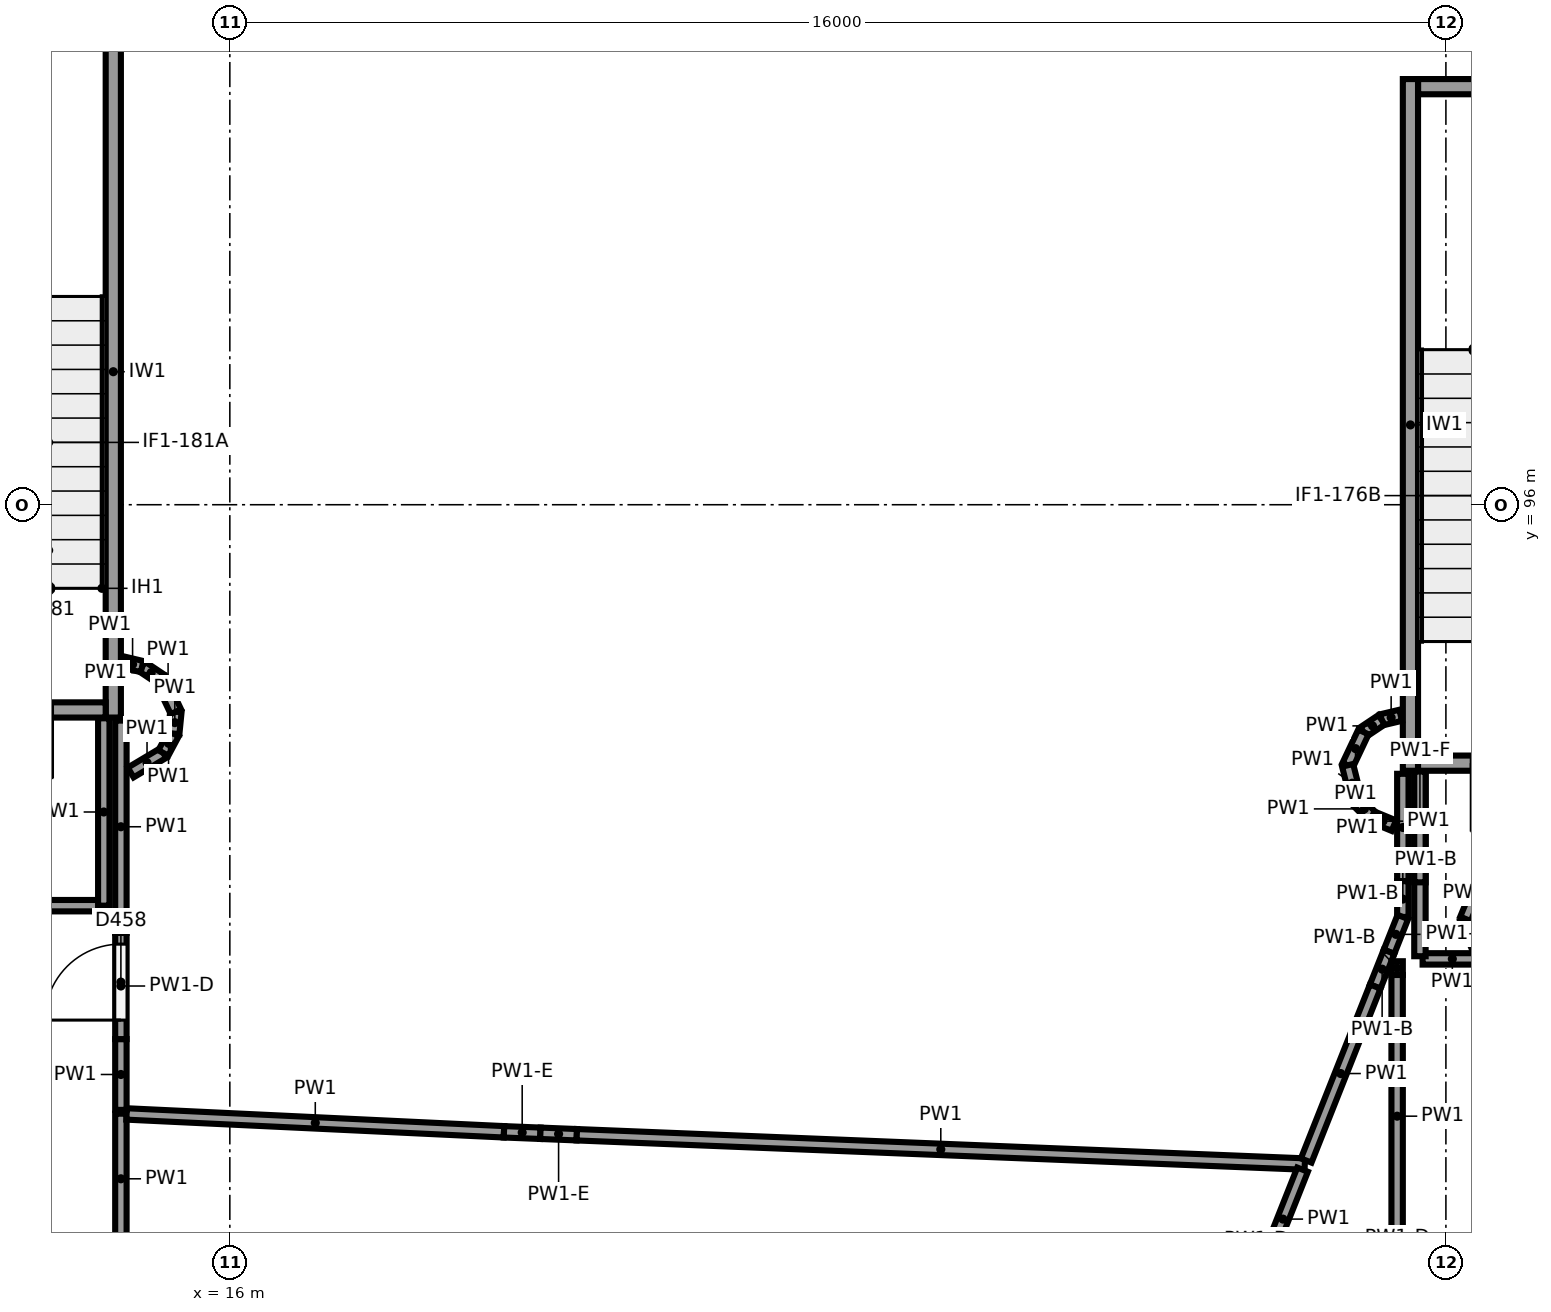
"""IFC4 building model, lengths in metres.
Left out: names, types, materials, properties, quantities, classifications, styles, units other than length and angle.
Written with IfcOpenShell. Run it as: python <this file> out.ifc"""

import sys

from ifc_helpers import new_model, si_unit, direction, frame, frame_2d, origin, origin_2d, place, context, subcontext, project, spatial, rectangle, circle, extrude, element, fill, save


model = new_model("IFC4")
c1 = context("Model", 3, precision=1e-05, world=origin(), true_north=direction((0.0, 1.0)))
c2 = subcontext(c1, "Body", "Model", "MODEL_VIEW")
j1 = project(units=[si_unit("LENGTHUNIT", "METRE"), si_unit("PLANEANGLEUNIT", "RADIAN")], contexts=[c1])
p1 = place(None, origin())
s1 = spatial("IfcSite", under=j1, at=p1, CompositionType="ELEMENT")
p2 = place(p1, origin())
s2 = spatial("IfcBuilding", under=s1, at=p2, CompositionType="ELEMENT")
p3 = place(p2, frame((0.0, 0.0, -4.0)))
s3 = spatial("IfcBuildingStorey", under=s2, at=p3, CompositionType="ELEMENT", Elevation=-4.0)
for number, where, z_axis, x_axis in (
    (1, (20.65, 89.656, -0.4), (0.0, 0.0, 1.0), (1.0, 0.0, 0.0)),
    (2, (23.0, 98.6, -0.4), (0.0, 0.0, 1.0), (1.0, 0.0, 0.0)),
):
    element("IfcColumn", number, at=place(p3, frame(where, z_axis=z_axis, x_axis=x_axis)), inside=s3, PredefinedType="COLUMN", context=c2, shape_type="SweptSolid", body=[
        extrude(circle(Radius=0.45, at=origin_2d()), origin(), (0.0, 0.0, 1.0), 4.4),
    ])
p4 = place(p3, frame((31.533, 101.6, -1.2), z_axis=(0.0, 0.0, 1.0), x_axis=(0.0, -1.0, 0.0)))
e3 = element("IfcWall", 3, at=p4, inside=s3, PredefinedType="SHEAR", context=c2, shape_type="SweptSolid", body=[
    extrude(rectangle(XDim=9.1, YDim=0.2, at=frame_2d((4.55, 0.0))), origin(), (0.0, 0.0, 1.0), 4.8),
])
p5 = place(p3, frame((38.233, 101.5, -1.2), z_axis=(0.0, 0.0, 1.0), x_axis=(-1.0, 0.0, 0.0)))
e4 = element("IfcWall", 4, at=p5, inside=s3, PredefinedType="SHEAR", context=c2, shape_type="SweptSolid", body=[
    extrude(rectangle(XDim=6.6, YDim=0.2, at=frame_2d((3.3, 0.0))), origin(), (0.0, 0.0, 1.0), 4.8),
])
p6 = place(p3, frame((34.833, 92.6, -1.2), z_axis=(0.0, 0.0, 1.0), x_axis=(-1.0, 0.0, 0.0)))
e5 = element("IfcWall", 5, at=p6, inside=s3, PredefinedType="SHEAR", context=c2, shape_type="SweptSolid", body=[
    extrude(rectangle(XDim=3.2, YDim=0.2, at=frame_2d((1.6, 0.0))), origin(), (0.0, 0.0, 1.0), 4.8),
])
p7 = place(p6, frame((0.7, 0.0, 1.2)))
e6 = element("IfcOpeningElement", 6, at=p7, cuts=e5, PredefinedType="OPENING", context=c2, shape_type="SweptSolid", body=[
    extrude(rectangle(XDim=1.8, YDim=2.1, at=frame_2d((0.9, 1.05))), frame((0.0, 0.11, 0.0), z_axis=(0.0, -1.0, 0.0), x_axis=(1.0, 0.0, 0.0)), (0.0, 0.0, 1.0), 0.22),
])
p8 = place(p3, frame((14.467, 102.3, -1.2), z_axis=(0.0, 0.0, 1.0), x_axis=(0.0, -1.0, 0.0)))
e7 = element("IfcWall", 7, at=p8, inside=s3, PredefinedType="SHEAR", context=c2, shape_type="SweptSolid", body=[
    extrude(rectangle(XDim=9.1, YDim=0.2, at=frame_2d((4.55, 0.0))), origin(), (0.0, 0.0, 1.0), 4.8),
])
p9 = place(p3, frame((14.367, 93.3, -1.2), z_axis=(0.0, 0.0, 1.0), x_axis=(-1.0, 0.0, 0.0)))
e8 = element("IfcWall", 8, at=p9, inside=s3, PredefinedType="SHEAR", context=c2, shape_type="SweptSolid", body=[
    extrude(rectangle(XDim=3.2, YDim=0.2, at=frame_2d((1.6, 0.0))), origin(), (0.0, 0.0, 1.0), 4.8),
])
p10 = place(p9, frame((0.7, 0.0, 1.2)))
e9 = element("IfcOpeningElement", 9, at=p10, cuts=e8, PredefinedType="OPENING", context=c2, shape_type="SweptSolid", body=[
    extrude(rectangle(XDim=1.8, YDim=2.1, at=frame_2d((0.9, 1.05))), frame((0.0, 0.11, 0.0), z_axis=(0.0, -1.0, 0.0), x_axis=(1.0, 0.0, 0.0)), (0.0, 0.0, 1.0), 0.22),
])
p11 = place(p3, frame((14.567, 86.275, 0.0), z_axis=(0.0, 0.0, 1.0), x_axis=(0.0, 1.0, 0.0)))
e10 = element("IfcWall", 10, at=p11, inside=s3, PredefinedType="PARTITIONING", context=c2, shape_type="SweptSolid", body=[
    extrude(rectangle(XDim=1.714, YDim=0.15, at=frame_2d((0.857, 0.0))), origin(), (0.0, 0.0, 1.0), 3.6),
])
p12 = place(p3, frame((14.642, 87.985, 0.0), z_axis=(0.0, 0.0, 1.0), x_axis=(0.998880990071, -0.047294478265, 0.0)))
e11 = element("IfcWall", 11, at=p12, inside=s3, PredefinedType="PARTITIONING", context=c2, shape_type="SweptSolid", body=[
    extrude(rectangle(XDim=4.971, YDim=0.15, at=frame_2d((2.486, 0.0))), origin(), (0.0, 0.0, 1.0), 3.6),
])
p13 = place(p3, frame((19.607, 87.75, 0.0), z_axis=(0.0, 0.0, 1.0), x_axis=(0.999190347819, -0.040232435004, 0.0)))
e12 = element("IfcWall", 12, at=p13, inside=s3, PredefinedType="PARTITIONING", context=c2, shape_type="SweptSolid", body=[
    extrude(rectangle(XDim=0.479, YDim=0.15, at=frame_2d((0.24, 0.0))), origin(), (0.0, 0.0, 1.0), 2.85),
])
p14 = place(p3, frame((20.086, 87.731, 0.0), z_axis=(0.0, 0.0, 1.0), x_axis=(0.999189522857, -0.040252918055, 0.0)))
e13 = element("IfcWall", 13, at=p14, inside=s3, PredefinedType="PARTITIONING", context=c2, shape_type="SweptSolid", body=[
    extrude(rectangle(XDim=0.479, YDim=0.15, at=frame_2d((0.24, 0.0))), origin(), (0.0, 0.0, 1.0), 2.85),
])
p15 = place(p3, frame((20.565, 87.711, 0.0), z_axis=(0.0, 0.0, 1.0), x_axis=(0.999191082899, -0.040214174799, 0.0)))
e14 = element("IfcWall", 14, at=p15, inside=s3, PredefinedType="PARTITIONING", context=c2, shape_type="SweptSolid", body=[
    extrude(rectangle(XDim=9.586, YDim=0.15, at=frame_2d((4.793, 0.0))), origin(), (0.0, 0.0, 1.0), 3.6),
])
p16 = place(p3, frame((30.114, 87.252, 0.0), z_axis=(0.0, 0.0, 1.0), x_axis=(-0.368802456255, -0.929507798924, 0.0)))
e15 = element("IfcWall", 15, at=p16, inside=s3, PredefinedType="PARTITIONING", context=c2, shape_type="SweptSolid", body=[
    extrude(rectangle(XDim=1.399, YDim=0.15, at=frame_2d((0.7, 0.0))), origin(), (0.0, 0.0, 1.0), 3.6),
])
p17 = place(p3, frame((14.567, 88.039, 0.0), z_axis=(0.0, 0.0, 1.0), x_axis=(0.0, 1.0, 0.0)))
e16 = element("IfcWall", 16, at=p17, inside=s3, PredefinedType="PARTITIONING", context=c2, shape_type="SweptSolid", body=[
    extrude(rectangle(XDim=0.931, YDim=0.15, at=frame_2d((0.466, 0.0))), origin(), (0.0, 0.0, 1.0), 3.6),
])
p18 = place(p3, frame((14.567, 88.97, 0.0), z_axis=(0.0, 0.0, 1.0), x_axis=(0.0, 1.0, 0.0)))
e17 = element("IfcWall", 17, at=p18, inside=s3, PredefinedType="PARTITIONING", context=c2, shape_type="SweptSolid", body=[
    extrude(rectangle(XDim=1.397, YDim=0.15, at=frame_2d((0.698, 0.0))), origin(), (0.0, 0.0, 1.0), 2.3),
])
p19 = place(p18, frame((0.25, 0.0, 0.0)))
e18 = element("IfcOpeningElement", 18, at=p19, cuts=e17, PredefinedType="OPENING", context=c2, shape_type="SweptSolid", body=[
    extrude(rectangle(XDim=1.0, YDim=2.1, at=frame_2d((0.5, 1.05))), frame((0.0, 0.085, 0.0), z_axis=(0.0, -1.0, 0.0), x_axis=(1.0, 0.0, 0.0)), (0.0, 0.0, 1.0), 0.17),
])
p20 = place(p3, frame((14.567, 90.366, 0.0), z_axis=(0.0, 0.0, 1.0), x_axis=(0.0, 1.0, 0.0)))
e19 = element("IfcWall", 19, at=p20, inside=s3, PredefinedType="PARTITIONING", context=c2, shape_type="SweptSolid", body=[
    extrude(rectangle(XDim=2.793, YDim=0.15, at=frame_2d((1.397, 0.0))), origin(), (0.0, 0.0, 1.0), 3.6),
])
p21 = place(p3, frame((31.433, 92.46, 0.0), z_axis=(0.0, 0.0, 1.0), x_axis=(0.0, -1.0, 0.0)))
e20 = element("IfcWall", 20, at=p21, inside=s3, PredefinedType="PARTITIONING", context=c2, shape_type="SweptSolid", body=[
    extrude(rectangle(XDim=1.413, YDim=0.15, at=frame_2d((0.706, 0.0))), origin(), (0.0, 0.0, 1.0), 3.6),
])
p22 = place(p3, frame((31.433, 91.047, 0.0), z_axis=(0.0, 0.0, 1.0), x_axis=(0.0, -1.0, 0.0)))
e21 = element("IfcWall", 21, at=p22, inside=s3, PredefinedType="PARTITIONING", context=c2, shape_type="SweptSolid", body=[
    extrude(rectangle(XDim=0.471, YDim=0.15, at=frame_2d((0.235, 0.0))), origin(), (0.0, 0.0, 1.0), 2.5),
])
for number, where, z_axis, x_axis in (
    (22, (31.433, 90.577, 0.0), (0.0, 0.0, 1.0), (-0.369, -0.929, 0.0)),
    (23, (31.252, 90.119, 0.0), (0.0, 0.0, 1.0), (-0.369, -0.929, 0.0)),
):
    element("IfcWall", number, at=place(p3, frame(where, z_axis=z_axis, x_axis=x_axis)), inside=s3, PredefinedType="PARTITIONING", context=c2, shape_type="SweptSolid", body=[
        extrude(rectangle(XDim=0.492, YDim=0.15, at=frame_2d((0.246, 0.0))), origin(), (0.0, 0.0, 1.0), 2.5),
    ])
p23 = place(p3, frame((31.07, 89.661, 0.0), z_axis=(0.0, 0.0, 1.0), x_axis=(-0.368825125467, -0.9294988041, 0.0)))
e24 = element("IfcWall", 24, at=p23, inside=s3, PredefinedType="PARTITIONING", context=c2, shape_type="SweptSolid", body=[
    extrude(rectangle(XDim=2.462, YDim=0.15, at=frame_2d((1.231, 0.0))), origin(), (0.0, 0.0, 1.0), 3.6),
])
p24 = place(p3, frame((31.693, 90.025, 0.0), z_axis=(0.0, 0.0, 1.0), x_axis=(1.0, 0.0, 0.0)))
e25 = element("IfcWall", 25, at=p24, inside=s3, PredefinedType="PARTITIONING", context=c2, shape_type="SweptSolid", body=[
    extrude(rectangle(XDim=0.782, YDim=0.15, at=frame_2d((0.391, 0.0))), origin(), (0.0, 0.0, 1.0), 3.6),
])
p25 = place(p3, frame((32.475, 90.025, 0.0), z_axis=(0.0, 0.0, 1.0), x_axis=(-0.382452777268, 0.923975039252, 0.0)))
e26 = element("IfcWall", 26, at=p25, inside=s3, PredefinedType="PARTITIONING", context=c2, shape_type="SweptSolid", body=[
    extrude(rectangle(XDim=0.569, YDim=0.15, at=frame_2d((0.285, 0.0))), origin(), (0.0, 0.0, 1.0), 2.5),
])
p26 = place(p3, frame((32.258, 90.551, 0.0), z_axis=(0.0, 0.0, 1.0), x_axis=(0.382666625355, 0.923886494024, 0.0)))
e27 = element("IfcWall", 27, at=p26, inside=s3, PredefinedType="PARTITIONING", context=c2, shape_type="SweptSolid", body=[
    extrude(rectangle(XDim=0.525, YDim=0.15, at=frame_2d((0.263, 0.0))), origin(), (0.0, 0.0, 1.0), 2.5),
])
p27 = place(p3, frame((31.658, 92.49, 0.0), z_axis=(0.0, 0.0, 1.0), x_axis=(0.0, -1.0, 0.0)))
e28 = element("IfcWall", 28, at=p27, inside=s3, PredefinedType="PARTITIONING", context=c2, shape_type="SweptSolid", body=[
    extrude(rectangle(XDim=2.43, YDim=0.15, at=frame_2d((1.215, 0.0))), origin(), (0.0, 0.0, 1.0), 2.5),
])
p28 = place(p3, frame((31.658, 92.49, 2.5), z_axis=(0.0, 0.0, 1.0), x_axis=(0.0, -1.0, 0.0)))
e29 = element("IfcWall", 29, at=p28, inside=s3, PredefinedType="PARTITIONING", context=c2, shape_type="SweptSolid", body=[
    extrude(rectangle(XDim=1.458, YDim=0.15, at=frame_2d((0.729, 0.0))), origin(), (0.0, 0.0, 1.0), 1.1),
])
p29 = place(p3, frame((31.358, 89.994, 0.0), z_axis=(0.0, 0.0, 1.0), x_axis=(0.0, -1.0, 0.0)))
e30 = element("IfcWall", 30, at=p29, inside=s3, PredefinedType="PARTITIONING", context=c2, shape_type="SweptSolid", body=[
    extrude(rectangle(XDim=0.181, YDim=0.15, at=frame_2d((0.09, 0.0))), origin(), (0.0, 0.0, 1.0), 2.5),
])
p30 = place(p3, frame((31.358, 89.813, 0.0), z_axis=(0.0, 0.0, 1.0), x_axis=(0.0, -1.0, 0.0)))
e31 = element("IfcWall", 31, at=p30, inside=s3, PredefinedType="PARTITIONING", context=c2, shape_type="SweptSolid", body=[
    extrude(rectangle(XDim=3.715, YDim=0.15, at=frame_2d((1.857, 0.0))), origin(), (0.0, 0.0, 1.0), 3.6),
])
p31 = place(p3, frame((31.405, 93.23, 0.0), z_axis=(0.0, 0.0, 1.0), x_axis=(-0.973130593004, -0.230253879357, 0.0)))
e32 = element("IfcWall", 32, at=p31, inside=s3, PredefinedType="PARTITIONING", context=c2, shape_type="SweptSolid", body=[
    extrude(rectangle(XDim=0.258, YDim=0.15, at=frame_2d((0.129, 0.0))), origin(), (0.0, 0.0, 1.0), 3.6),
])
p32 = place(p3, frame((31.154, 93.17, 0.0), z_axis=(0.0, 0.0, 1.0), x_axis=(-0.831397130511, -0.555678694372, 0.0)))
e33 = element("IfcWall", 33, at=p32, inside=s3, PredefinedType="PARTITIONING", context=c2, shape_type="SweptSolid", body=[
    extrude(rectangle(XDim=0.288, YDim=0.15, at=frame_2d((0.144, 0.0))), origin(), (0.0, 0.0, 1.0), 3.6),
])
for number, where, z_axis, x_axis in (
    (34, (30.915, 93.01, 0.0), (0.0, 0.0, 1.0), (-0.428, -0.904, 0.0)),
    (35, (30.707, 92.572, 0.0), (0.0, 0.0, 1.0), (0.243, -0.97, 0.0)),
):
    element("IfcWall", number, at=place(p3, frame(where, z_axis=z_axis, x_axis=x_axis)), inside=s3, PredefinedType="PARTITIONING", context=c2, shape_type="SweptSolid", body=[
        extrude(rectangle(XDim=0.486, YDim=0.15, at=frame_2d((0.243, 0.0))), origin(), (0.0, 0.0, 1.0), 3.6),
    ])
p33 = place(p3, frame((30.825, 92.101, 0.0), z_axis=(0.0, 0.0, 1.0), x_axis=(0.707106781187, -0.707106781187, 0.0)))
e36 = element("IfcWall", 36, at=p33, inside=s3, PredefinedType="PARTITIONING", context=c2, shape_type="SweptSolid", body=[
    extrude(rectangle(XDim=0.289, YDim=0.15, at=frame_2d((0.145, 0.0))), origin(), (0.0, 0.0, 1.0), 3.6),
])
p34 = place(p3, frame((31.03, 91.896, 0.0), z_axis=(0.0, 0.0, 1.0), x_axis=(0.923707957869, -0.383097387839, 0.0)))
e37 = element("IfcWall", 37, at=p34, inside=s3, PredefinedType="PARTITIONING", context=c2, shape_type="SweptSolid", body=[
    extrude(rectangle(XDim=0.308, YDim=0.15, at=frame_2d((0.154, 0.0))), origin(), (0.0, 0.0, 1.0), 3.6),
])
p35 = place(p3, frame((10.327, 90.725, 0.0), z_axis=(0.0, 0.0, 1.0), x_axis=(1.0, 0.0, 0.0)))
e38 = element("IfcWall", 38, at=p35, inside=s3, PredefinedType="PARTITIONING", context=c2, shape_type="SweptSolid", body=[
    extrude(rectangle(XDim=4.015, YDim=0.15, at=frame_2d((2.008, 0.0))), origin(), (0.0, 0.0, 1.0), 3.6),
])
p36 = place(p35, frame((1.05, 0.0, 0.0)))
e39 = element("IfcOpeningElement", 39, at=p36, cuts=e38, PredefinedType="OPENING", context=c2, shape_type="SweptSolid", body=[
    extrude(rectangle(XDim=1.8, YDim=2.1, at=frame_2d((0.9, 1.05))), frame((0.0, 0.085, 0.0), z_axis=(0.0, -1.0, 0.0), x_axis=(1.0, 0.0, 0.0)), (0.0, 0.0, 1.0), 0.17),
])
p37 = place(p3, frame((14.342, 90.725, 0.0), z_axis=(0.0, 0.0, 1.0), x_axis=(0.0, 1.0, 0.0)))
e40 = element("IfcWall", 40, at=p37, inside=s3, PredefinedType="PARTITIONING", context=c2, shape_type="SweptSolid", body=[
    extrude(rectangle(XDim=2.465, YDim=0.15, at=frame_2d((1.232, 0.0))), origin(), (0.0, 0.0, 1.0), 3.6),
])
p38 = place(p3, frame((14.696, 92.477, 0.0), z_axis=(0.0, 0.0, 1.0), x_axis=(0.85856712863, 0.512701166017, 0.0)))
e41 = element("IfcWall", 41, at=p38, inside=s3, PredefinedType="PARTITIONING", context=c2, shape_type="SweptSolid", body=[
    extrude(rectangle(XDim=0.5, YDim=0.15, at=frame_2d((0.25, 0.0))), origin(), (0.0, 0.0, 1.0), 3.6),
])
p39 = place(p3, frame((15.125, 92.734, 0.0), z_axis=(0.0, 0.0, 1.0), x_axis=(0.471682765858, 0.881768319, 0.0)))
e42 = element("IfcWall", 42, at=p39, inside=s3, PredefinedType="PARTITIONING", context=c2, shape_type="SweptSolid", body=[
    extrude(rectangle(XDim=0.289, YDim=0.15, at=frame_2d((0.145, 0.0))), origin(), (0.0, 0.0, 1.0), 3.6),
])
p40 = place(p3, frame((15.262, 92.989, 0.0), z_axis=(0.0, 0.0, 1.0), x_axis=(0.0978334953, 0.99520279702, 0.0)))
e43 = element("IfcWall", 43, at=p40, inside=s3, PredefinedType="PARTITIONING", context=c2, shape_type="SweptSolid", body=[
    extrude(rectangle(XDim=0.29, YDim=0.15, at=frame_2d((0.145, 0.0))), origin(), (0.0, 0.0, 1.0), 3.6),
])
p41 = place(p3, frame((15.29, 93.277, 0.0), z_axis=(0.0, 0.0, 1.0), x_axis=(-0.427757963167, 0.903893315025, 0.0)))
e44 = element("IfcWall", 44, at=p41, inside=s3, PredefinedType="PARTITIONING", context=c2, shape_type="SweptSolid", body=[
    extrude(rectangle(XDim=0.479, YDim=0.15, at=frame_2d((0.24, 0.0))), origin(), (0.0, 0.0, 1.0), 3.6),
])
p42 = place(p3, frame((15.085, 93.71, 0.0), z_axis=(0.0, 0.0, 1.0), x_axis=(-0.831397130511, 0.555678694372, 0.0)))
e45 = element("IfcWall", 45, at=p42, inside=s3, PredefinedType="PARTITIONING", context=c2, shape_type="SweptSolid", body=[
    extrude(rectangle(XDim=0.288, YDim=0.15, at=frame_2d((0.144, 0.0))), origin(), (0.0, 0.0, 1.0), 3.6),
])
p43 = place(p3, frame((14.846, 93.87, 0.0), z_axis=(0.0, 0.0, 1.0), x_axis=(-0.973130593004, 0.230253879357, 0.0)))
e46 = element("IfcWall", 46, at=p43, inside=s3, PredefinedType="PARTITIONING", context=c2, shape_type="SweptSolid", body=[
    extrude(rectangle(XDim=0.258, YDim=0.15, at=frame_2d((0.129, 0.0))), origin(), (0.0, 0.0, 1.0), 3.6),
])
p44 = place(p10, origin())
e47 = element("IfcDoor", 47, at=p44, inside=s3, OperationType="DOUBLE_DOOR_SINGLE_SWING", PredefinedType="DOOR", context=c2, shape_type="SweptSolid", body=[
    extrude(rectangle(XDim=1.8, YDim=2.1, at=frame_2d((0.9, 1.05))), frame((0.0, 0.025, 0.0), z_axis=(0.0, -1.0, 0.0), x_axis=(1.0, 0.0, 0.0)), (0.0, 0.0, 1.0), 0.05),
])
fill(e9, e47)
p45 = place(p19, origin())
e48 = element("IfcDoor", 48, at=p45, inside=s3, OperationType="SINGLE_SWING_LEFT", PredefinedType="DOOR", context=c2, shape_type="SweptSolid", body=[
    extrude(rectangle(XDim=1.0, YDim=2.1, at=frame_2d((0.5, 1.05))), frame((0.0, 0.025, 0.0), z_axis=(0.0, -1.0, 0.0), x_axis=(1.0, 0.0, 0.0)), (0.0, 0.0, 1.0), 0.05),
])
fill(e18, e48)
save(model, sys.argv[1])
